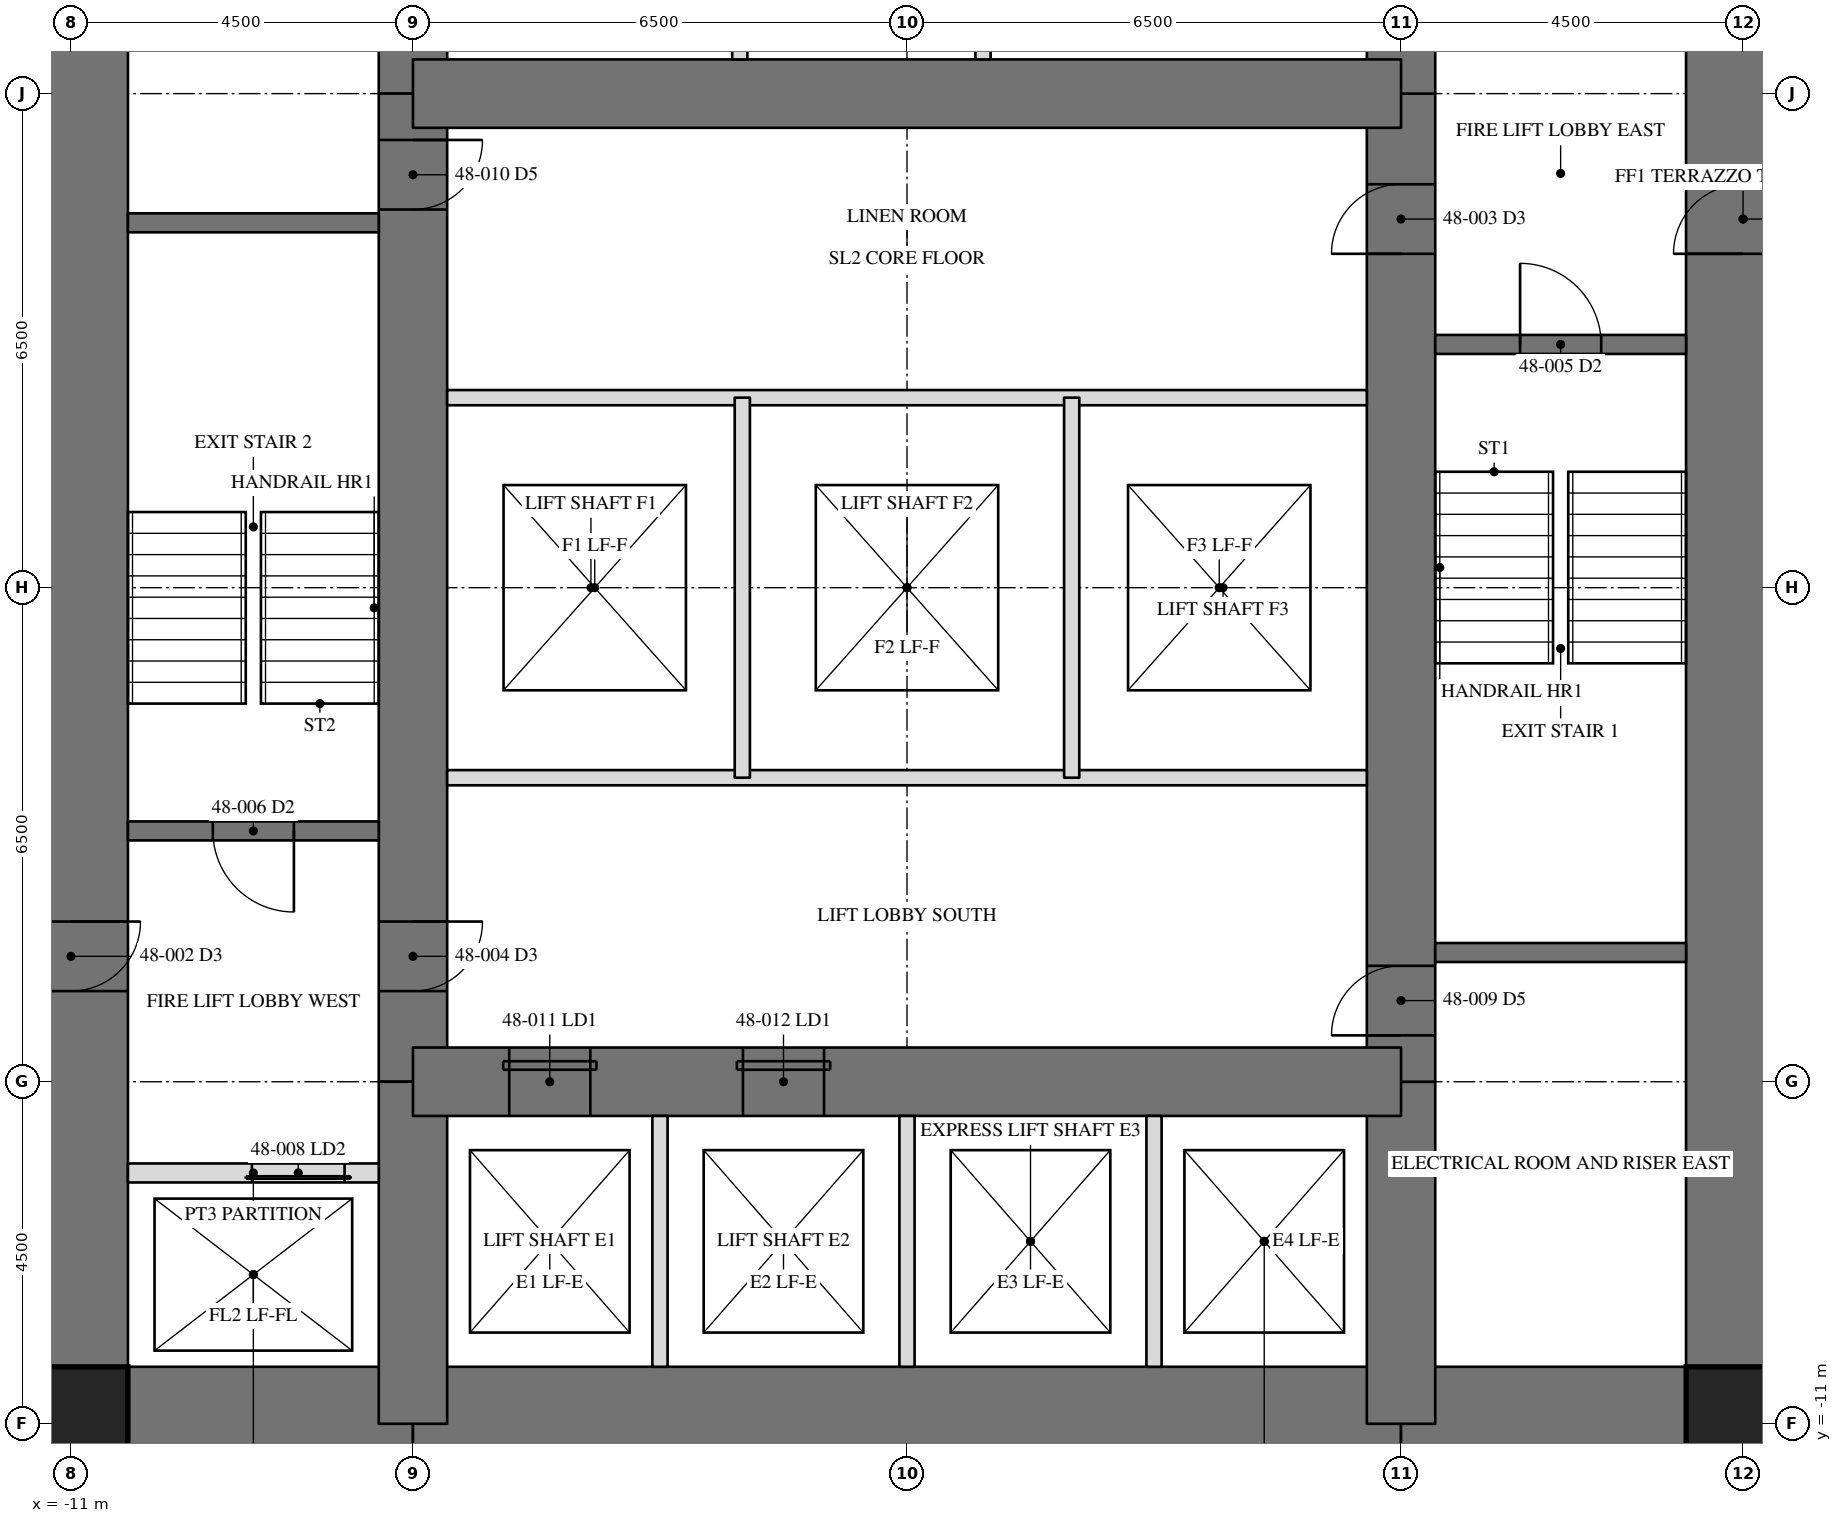
"""IFC4 building model, lengths in metres.
Left out: names, types, materials, properties, quantities, classifications, styles, units other than length and angle.
Written with IfcOpenShell. Run it as: python <this file> out.ifc"""

import sys

from ifc_helpers import new_model, si_unit, direction, frame, frame_2d, origin, origin_2d, place, context, subcontext, project, spatial, rectangle, hollow_rectangle, extrude, element, fill, save


model = new_model("IFC4")
c1 = context("Model", 3, precision=1e-05, world=origin(), true_north=direction((0.0, 1.0)))
c2 = subcontext(c1, "Body", "Model", "MODEL_VIEW")
j1 = project(units=[si_unit("LENGTHUNIT", "METRE"), si_unit("PLANEANGLEUNIT", "RADIAN")], contexts=[c1])
p1 = place(None, origin())
s1 = spatial("IfcSite", under=j1, at=p1, CompositionType="ELEMENT")
p2 = place(p1, origin())
s2 = spatial("IfcBuilding", under=s1, at=p2, CompositionType="ELEMENT")
p3 = place(p2, frame((0.0, 0.0, 204.7)))
s3 = spatial("IfcBuildingStorey", under=s2, at=p3, CompositionType="ELEMENT", Elevation=204.7)
p4 = place(p3, frame((11.0, -11.0, 0.0), z_axis=(0.0, 0.0, 1.0), x_axis=(0.0, 1.0, 0.0)))
e1 = element("IfcWall", 1, at=p4, inside=s3, PredefinedType="SHEAR", context=c2, shape_type="SweptSolid", body=[
    extrude(rectangle(XDim=22.0, YDim=1.5, at=frame_2d((11.0, 0.0))), origin(), (0.0, 0.0, 1.0), 3.5),
])
p5 = place(p4, frame((15.393, 0.0, 0.0)))
e2 = element("IfcOpeningElement", 2, at=p5, cuts=e1, PredefinedType="OPENING", context=c2, shape_type="SweptSolid", body=[
    extrude(rectangle(XDim=0.915, YDim=2.134, at=frame_2d((0.458, 1.067))), frame((0.0, 0.76, 0.0), z_axis=(0.0, -1.0, 0.0), x_axis=(1.0, 0.0, 0.0)), (0.0, 0.0, 1.0), 1.52),
])
p6 = place(p3, frame((-11.0, 11.0, 0.0), z_axis=(0.0, 0.0, 1.0), x_axis=(0.0, -1.0, 0.0)))
e3 = element("IfcWall", 3, at=p6, inside=s3, PredefinedType="SHEAR", context=c2, shape_type="SweptSolid", body=[
    extrude(rectangle(XDim=22.0, YDim=1.5, at=frame_2d((11.0, 0.0))), origin(), (0.0, 0.0, 1.0), 3.5),
])
p7 = place(p6, frame((15.393, 0.0, 0.0)))
e4 = element("IfcOpeningElement", 4, at=p7, cuts=e3, PredefinedType="OPENING", context=c2, shape_type="SweptSolid", body=[
    extrude(rectangle(XDim=0.915, YDim=2.134, at=frame_2d((0.458, 1.067))), frame((0.0, 0.76, 0.0), z_axis=(0.0, -1.0, 0.0), x_axis=(1.0, 0.0, 0.0)), (0.0, 0.0, 1.0), 1.52),
])
p8 = place(p3, frame((-11.0, -11.0, 0.0), z_axis=(0.0, 0.0, 1.0), x_axis=(1.0, 0.0, 0.0)))
e5 = element("IfcWall", 5, at=p8, inside=s3, PredefinedType="SHEAR", context=c2, shape_type="SweptSolid", body=[
    extrude(rectangle(XDim=4.5, YDim=1.5, at=frame_2d((2.25, 0.0))), origin(), (0.0, 0.0, 1.0), 3.5),
])
p9 = place(p3, frame((-6.5, -11.0, 0.0), z_axis=(0.0, 0.0, 1.0), x_axis=(1.0, 0.0, 0.0)))
e6 = element("IfcWall", 6, at=p9, inside=s3, PredefinedType="SHEAR", context=c2, shape_type="SweptSolid", body=[
    extrude(rectangle(XDim=13.0, YDim=1.5, at=frame_2d((6.5, 0.0))), origin(), (0.0, 0.0, 1.0), 3.5),
])
p10 = place(p3, frame((6.5, -11.0, 0.0), z_axis=(0.0, 0.0, 1.0), x_axis=(1.0, 0.0, 0.0)))
e7 = element("IfcWall", 7, at=p10, inside=s3, PredefinedType="SHEAR", context=c2, shape_type="SweptSolid", body=[
    extrude(rectangle(XDim=4.5, YDim=1.5, at=frame_2d((2.25, 0.0))), origin(), (0.0, 0.0, 1.0), 3.5),
])
p11 = place(p3, frame((6.5, -11.0, 0.0), z_axis=(0.0, 0.0, 1.0), x_axis=(0.0, 1.0, 0.0)))
e8 = element("IfcWall", 8, at=p11, inside=s3, PredefinedType="SHEAR", context=c2, shape_type="SweptSolid", body=[
    extrude(rectangle(XDim=4.5, YDim=0.9, at=frame_2d((2.25, 0.0))), origin(), (0.0, 0.0, 1.0), 3.5),
])
p12 = place(p3, frame((6.5, -6.5, 0.0), z_axis=(0.0, 0.0, 1.0), x_axis=(0.0, 1.0, 0.0)))
e9 = element("IfcWall", 9, at=p12, inside=s3, PredefinedType="SHEAR", context=c2, shape_type="SweptSolid", body=[
    extrude(rectangle(XDim=13.0, YDim=0.9, at=frame_2d((6.5, 0.0))), origin(), (0.0, 0.0, 1.0), 3.5),
])
p13 = place(p12, frame((10.893, 0.0, 0.0)))
e10 = element("IfcOpeningElement", 10, at=p13, cuts=e9, PredefinedType="OPENING", context=c2, shape_type="SweptSolid", body=[
    extrude(rectangle(XDim=0.915, YDim=2.134, at=frame_2d((0.458, 1.067))), frame((0.0, 0.46, 0.0), z_axis=(0.0, -1.0, 0.0), x_axis=(1.0, 0.0, 0.0)), (0.0, 0.0, 1.0), 0.92),
])
p14 = place(p12, frame((0.61, 0.0, 0.0)))
e11 = element("IfcOpeningElement", 11, at=p14, cuts=e9, PredefinedType="OPENING", context=c2, shape_type="SweptSolid", body=[
    extrude(rectangle(XDim=0.915, YDim=2.134, at=frame_2d((0.458, 1.067))), frame((0.0, 0.46, 0.0), z_axis=(0.0, -1.0, 0.0), x_axis=(1.0, 0.0, 0.0)), (0.0, 0.0, 1.0), 0.92),
])
for number, where, z_axis, x_axis in (
    (12, (6.5, 6.5, 0.0), (0.0, 0.0, 1.0), (0.0, 1.0, 0.0)),
    (13, (-6.5, 11.0, 0.0), (0.0, 0.0, 1.0), (0.0, -1.0, 0.0)),
):
    element("IfcWall", number, at=place(p3, frame(where, z_axis=z_axis, x_axis=x_axis)), inside=s3, PredefinedType="SHEAR", context=c2, shape_type="SweptSolid", body=[
        extrude(rectangle(XDim=4.5, YDim=0.9, at=frame_2d((2.25, 0.0))), origin(), (0.0, 0.0, 1.0), 3.5),
    ])
p15 = place(p3, frame((-6.5, 6.5, 0.0), z_axis=(0.0, 0.0, 1.0), x_axis=(0.0, -1.0, 0.0)))
e14 = element("IfcWall", 14, at=p15, inside=s3, PredefinedType="SHEAR", context=c2, shape_type="SweptSolid", body=[
    extrude(rectangle(XDim=13.0, YDim=0.9, at=frame_2d((6.5, 0.0))), origin(), (0.0, 0.0, 1.0), 3.5),
])
p16 = place(p15, frame((10.893, 0.0, 0.0)))
e15 = element("IfcOpeningElement", 15, at=p16, cuts=e14, PredefinedType="OPENING", context=c2, shape_type="SweptSolid", body=[
    extrude(rectangle(XDim=0.915, YDim=2.134, at=frame_2d((0.458, 1.067))), frame((0.0, 0.46, 0.0), z_axis=(0.0, -1.0, 0.0), x_axis=(1.0, 0.0, 0.0)), (0.0, 0.0, 1.0), 0.92),
])
p17 = place(p15, frame((0.61, 0.0, 0.0)))
e16 = element("IfcOpeningElement", 16, at=p17, cuts=e14, PredefinedType="OPENING", context=c2, shape_type="SweptSolid", body=[
    extrude(rectangle(XDim=0.915, YDim=2.134, at=frame_2d((0.458, 1.067))), frame((0.0, 0.46, 0.0), z_axis=(0.0, -1.0, 0.0), x_axis=(1.0, 0.0, 0.0)), (0.0, 0.0, 1.0), 0.92),
])
p18 = place(p3, frame((-6.5, -6.5, 0.0), z_axis=(0.0, 0.0, 1.0), x_axis=(0.0, -1.0, 0.0)))
e17 = element("IfcWall", 17, at=p18, inside=s3, PredefinedType="SHEAR", context=c2, shape_type="SweptSolid", body=[
    extrude(rectangle(XDim=4.5, YDim=0.9, at=frame_2d((2.25, 0.0))), origin(), (0.0, 0.0, 1.0), 3.5),
])
p19 = place(p3, frame((6.5, 6.5, 0.0), z_axis=(0.0, 0.0, 1.0), x_axis=(-1.0, 0.0, 0.0)))
e18 = element("IfcWall", 18, at=p19, inside=s3, PredefinedType="SHEAR", context=c2, shape_type="SweptSolid", body=[
    extrude(rectangle(XDim=13.0, YDim=0.9, at=frame_2d((6.5, 0.0))), origin(), (0.0, 0.0, 1.0), 3.5),
])
p20 = place(p3, frame((-6.5, -6.5, 0.0), z_axis=(0.0, 0.0, 1.0), x_axis=(1.0, 0.0, 0.0)))
e19 = element("IfcWall", 19, at=p20, inside=s3, PredefinedType="SHEAR", context=c2, shape_type="SweptSolid", body=[
    extrude(rectangle(XDim=13.0, YDim=0.9, at=frame_2d((6.5, 0.0))), origin(), (0.0, 0.0, 1.0), 3.5),
])
p21 = place(p20, frame((1.267, 0.0, 0.0)))
e20 = element("IfcOpeningElement", 20, at=p21, cuts=e19, PredefinedType="OPENING", context=c2, shape_type="SweptSolid", body=[
    extrude(rectangle(XDim=1.067, YDim=2.134, at=frame_2d((0.533, 1.067))), frame((0.0, 0.46, 0.0), z_axis=(0.0, -1.0, 0.0), x_axis=(1.0, 0.0, 0.0)), (0.0, 0.0, 1.0), 0.92),
])
p22 = place(p20, frame((4.342, 0.0, 0.0)))
e21 = element("IfcOpeningElement", 21, at=p22, cuts=e19, PredefinedType="OPENING", context=c2, shape_type="SweptSolid", body=[
    extrude(rectangle(XDim=1.067, YDim=2.134, at=frame_2d((0.533, 1.067))), frame((0.0, 0.46, 0.0), z_axis=(0.0, -1.0, 0.0), x_axis=(1.0, 0.0, 0.0)), (0.0, 0.0, 1.0), 0.92),
])
for number, where, z_axis, x_axis in (
    (22, (-11.0, -11.0, 0.0), (0.0, 0.0, 1.0), (1.0, 0.0, 0.0)),
    (23, (11.0, -11.0, 0.0), (0.0, 0.0, 1.0), (1.0, 0.0, 0.0)),
):
    element("IfcColumn", number, at=place(p3, frame(where, z_axis=z_axis, x_axis=x_axis)), inside=s3, PredefinedType="COLUMN", context=c2, shape_type="SweptSolid", body=[
        extrude(hollow_rectangle(XDim=1.499, YDim=1.499, WallThickness=0.102, at=origin_2d()), origin(), (0.0, 0.0, 1.0), 3.5),
    ])
for number, where, z_axis, x_axis in (
    (24, (6.95, -4.8, 0.0), (0.0, 0.0, 1.0), (1.0, 0.0, 0.0)),
    (25, (-6.95, 4.8, 0.0), (0.0, 0.0, 1.0), (-1.0, 0.0, 0.0)),
):
    element("IfcWall", number, at=place(p3, frame(where, z_axis=z_axis, x_axis=x_axis)), inside=s3, PredefinedType="SOLIDWALL", context=c2, shape_type="SweptSolid", body=[
        extrude(rectangle(XDim=3.3, YDim=0.25, at=frame_2d((1.65, 0.0))), origin(), (0.0, 0.0, 1.0), 3.31),
    ])
p23 = place(p3, frame((6.95, 3.2, 0.0), z_axis=(0.0, 0.0, 1.0), x_axis=(1.0, 0.0, 0.0)))
e26 = element("IfcWall", 26, at=p23, inside=s3, PredefinedType="SOLIDWALL", context=c2, shape_type="SweptSolid", body=[
    extrude(rectangle(XDim=3.3, YDim=0.25, at=frame_2d((1.65, 0.0))), origin(), (0.0, 0.0, 1.0), 3.31),
])
p24 = place(p23, frame((1.116, 0.0, 0.0)))
e27 = element("IfcOpeningElement", 27, at=p24, cuts=e26, PredefinedType="OPENING", context=c2, shape_type="SweptSolid", body=[
    extrude(rectangle(XDim=1.067, YDim=2.134, at=frame_2d((0.533, 1.067))), frame((0.0, 0.135, 0.0), z_axis=(0.0, -1.0, 0.0), x_axis=(1.0, 0.0, 0.0)), (0.0, 0.0, 1.0), 0.27),
])
p25 = place(p3, frame((-6.95, -3.2, 0.0), z_axis=(0.0, 0.0, 1.0), x_axis=(-1.0, 0.0, 0.0)))
e28 = element("IfcWall", 28, at=p25, inside=s3, PredefinedType="SOLIDWALL", context=c2, shape_type="SweptSolid", body=[
    extrude(rectangle(XDim=3.3, YDim=0.25, at=frame_2d((1.65, 0.0))), origin(), (0.0, 0.0, 1.0), 3.31),
])
p26 = place(p25, frame((1.116, 0.0, 0.0)))
e29 = element("IfcOpeningElement", 29, at=p26, cuts=e28, PredefinedType="OPENING", context=c2, shape_type="SweptSolid", body=[
    extrude(rectangle(XDim=1.067, YDim=2.134, at=frame_2d((0.533, 1.067))), frame((0.0, 0.135, 0.0), z_axis=(0.0, -1.0, 0.0), x_axis=(1.0, 0.0, 0.0)), (0.0, 0.0, 1.0), 0.27),
])
p27 = place(p3, frame((-6.95, -7.7, 0.0), z_axis=(0.0, 0.0, 1.0), x_axis=(-1.0, 0.0, 0.0)))
e30 = element("IfcWall", 30, at=p27, inside=s3, PredefinedType="PARTITIONING", context=c2, shape_type="SweptSolid", body=[
    extrude(rectangle(XDim=3.3, YDim=0.25, at=frame_2d((1.65, 0.0))), origin(), (0.0, 0.0, 1.0), 3.31),
])
p28 = place(p27, frame((0.45, 0.0, 0.0)))
e31 = element("IfcOpeningElement", 31, at=p28, cuts=e30, PredefinedType="OPENING", context=c2, shape_type="SweptSolid", body=[
    extrude(rectangle(XDim=1.219, YDim=2.134, at=frame_2d((0.609, 1.067))), frame((0.0, 0.135, 0.0), z_axis=(0.0, -1.0, 0.0), x_axis=(1.0, 0.0, 0.0)), (0.0, 0.0, 1.0), 0.27),
])
for number, where, z_axis, x_axis in (
    (32, (-6.05, 2.5, 0.0), (0.0, 0.0, 1.0), (1.0, 0.0, 0.0)),
    (33, (6.05, -2.5, 0.0), (0.0, 0.0, 1.0), (-1.0, 0.0, 0.0)),
):
    element("IfcWall", number, at=place(p3, frame(where, z_axis=z_axis, x_axis=x_axis)), inside=s3, PredefinedType="PARTITIONING", context=c2, shape_type="SweptSolid", body=[
        extrude(rectangle(XDim=12.1, YDim=0.2, at=frame_2d((6.05, 0.0))), origin(), (0.0, 0.0, 1.0), 3.31),
    ])
for number, where, z_axis, x_axis in (
    (34, (-3.25, -10.25, 0.0), (0.0, 0.0, 1.0), (0.0, 1.0, 0.0)),
    (35, (0.0, -10.25, 0.0), (0.0, 0.0, 1.0), (0.0, 1.0, 0.0)),
    (36, (3.25, -10.25, 0.0), (0.0, 0.0, 1.0), (0.0, 1.0, 0.0)),
):
    element("IfcWall", number, at=place(p3, frame(where, z_axis=z_axis, x_axis=x_axis)), inside=s3, PredefinedType="PARTITIONING", context=c2, shape_type="SweptSolid", body=[
        extrude(rectangle(XDim=3.3, YDim=0.2, at=frame_2d((1.65, 0.0))), origin(), (0.0, 0.0, 1.0), 3.31),
    ])
for number, where, z_axis, x_axis in (
    (37, (-2.167, -2.5, 0.0), (0.0, 0.0, 1.0), (0.0, 1.0, 0.0)),
    (38, (2.167, -2.5, 0.0), (0.0, 0.0, 1.0), (0.0, 1.0, 0.0)),
):
    element("IfcWall", number, at=place(p3, frame(where, z_axis=z_axis, x_axis=x_axis)), inside=s3, PredefinedType="PARTITIONING", context=c2, shape_type="SweptSolid", body=[
        extrude(rectangle(XDim=5.0, YDim=0.2, at=frame_2d((2.5, 0.0))), origin(), (0.0, 0.0, 1.0), 3.31),
    ])
p29 = place(p3, frame((-2.2, 6.95, 0.0), z_axis=(0.0, 0.0, 1.0), x_axis=(0.0, 1.0, 0.0)))
e39 = element("IfcWall", 39, at=p29, inside=s3, PredefinedType="PARTITIONING", context=c2, shape_type="SweptSolid", body=[
    extrude(rectangle(XDim=3.3, YDim=0.2, at=frame_2d((1.65, 0.0))), origin(), (0.0, 0.0, 1.0), 3.31),
])
p30 = place(p29, frame((1.192, 0.0, 0.0)))
e40 = element("IfcOpeningElement", 40, at=p30, cuts=e39, PredefinedType="OPENING", context=c2, shape_type="SweptSolid", body=[
    extrude(rectangle(XDim=0.915, YDim=2.134, at=frame_2d((0.458, 1.067))), frame((0.0, 0.11, 0.0), z_axis=(0.0, -1.0, 0.0), x_axis=(1.0, 0.0, 0.0)), (0.0, 0.0, 1.0), 0.22),
])
p31 = place(p3, frame((1.0, 6.95, 0.0), z_axis=(0.0, 0.0, 1.0), x_axis=(0.0, 1.0, 0.0)))
e41 = element("IfcWall", 41, at=p31, inside=s3, PredefinedType="PARTITIONING", context=c2, shape_type="SweptSolid", body=[
    extrude(rectangle(XDim=3.3, YDim=0.2, at=frame_2d((1.65, 0.0))), origin(), (0.0, 0.0, 1.0), 3.31),
])
p32 = place(p31, frame((1.192, 0.0, 0.0)))
e42 = element("IfcOpeningElement", 42, at=p32, cuts=e41, PredefinedType="OPENING", context=c2, shape_type="SweptSolid", body=[
    extrude(rectangle(XDim=0.915, YDim=2.134, at=frame_2d((0.458, 1.067))), frame((0.0, 0.11, 0.0), z_axis=(0.0, -1.0, 0.0), x_axis=(1.0, 0.0, 0.0)), (0.0, 0.0, 1.0), 0.22),
])
p33 = place(p13, origin())
e43 = element("IfcDoor", 43, at=p33, inside=s3, OperationType="SINGLE_SWING_RIGHT", PredefinedType="DOOR", context=c2, shape_type="SweptSolid", body=[
    extrude(rectangle(XDim=0.915, YDim=2.134, at=frame_2d((0.458, 1.067))), frame((0.0, -0.375, 0.0), z_axis=(0.0, -1.0, 0.0), x_axis=(1.0, 0.0, 0.0)), (0.0, 0.0, 1.0), 0.05),
])
fill(e10, e43)
p34 = place(p16, origin())
e44 = element("IfcDoor", 44, at=p34, inside=s3, OperationType="SINGLE_SWING_RIGHT", PredefinedType="DOOR", context=c2, shape_type="SweptSolid", body=[
    extrude(rectangle(XDim=0.915, YDim=2.134, at=frame_2d((0.458, 1.067))), frame((0.0, -0.375, 0.0), z_axis=(0.0, -1.0, 0.0), x_axis=(1.0, 0.0, 0.0)), (0.0, 0.0, 1.0), 0.05),
])
fill(e15, e44)
p35 = place(p24, origin())
e45 = element("IfcDoor", 45, at=p35, inside=s3, OperationType="SINGLE_SWING_LEFT", PredefinedType="DOOR", context=c2, shape_type="SweptSolid", body=[
    extrude(rectangle(XDim=1.067, YDim=2.134, at=frame_2d((0.533, 1.067))), frame((0.0, 0.025, 0.0), z_axis=(0.0, -1.0, 0.0), x_axis=(1.0, 0.0, 0.0)), (0.0, 0.0, 1.0), 0.05),
])
fill(e27, e45)
p36 = place(p26, origin())
e46 = element("IfcDoor", 46, at=p36, inside=s3, OperationType="SINGLE_SWING_LEFT", PredefinedType="DOOR", context=c2, shape_type="SweptSolid", body=[
    extrude(rectangle(XDim=1.067, YDim=2.134, at=frame_2d((0.533, 1.067))), frame((0.0, 0.025, 0.0), z_axis=(0.0, -1.0, 0.0), x_axis=(1.0, 0.0, 0.0)), (0.0, 0.0, 1.0), 0.05),
])
fill(e29, e46)
p37 = place(p28, origin())
e47 = element("IfcDoor", 47, at=p37, inside=s3, OperationType="SLIDING_TO_LEFT", PredefinedType="DOOR", context=c2, shape_type="SweptSolid", body=[
    extrude(rectangle(XDim=1.219, YDim=2.134, at=frame_2d((0.609, 1.067))), frame((0.0, 0.025, 0.0), z_axis=(0.0, -1.0, 0.0), x_axis=(1.0, 0.0, 0.0)), (0.0, 0.0, 1.0), 0.05),
])
fill(e31, e47)
p38 = place(p14, origin())
e48 = element("IfcDoor", 48, at=p38, inside=s3, OperationType="SINGLE_SWING_RIGHT", PredefinedType="DOOR", context=c2, shape_type="SweptSolid", body=[
    extrude(rectangle(XDim=0.915, YDim=2.134, at=frame_2d((0.458, 1.067))), frame((0.0, -0.375, 0.0), z_axis=(0.0, -1.0, 0.0), x_axis=(1.0, 0.0, 0.0)), (0.0, 0.0, 1.0), 0.05),
])
fill(e11, e48)
p39 = place(p17, origin())
e49 = element("IfcDoor", 49, at=p39, inside=s3, OperationType="SINGLE_SWING_RIGHT", PredefinedType="DOOR", context=c2, shape_type="SweptSolid", body=[
    extrude(rectangle(XDim=0.915, YDim=2.134, at=frame_2d((0.458, 1.067))), frame((0.0, -0.375, 0.0), z_axis=(0.0, -1.0, 0.0), x_axis=(1.0, 0.0, 0.0)), (0.0, 0.0, 1.0), 0.05),
])
fill(e16, e49)
p40 = place(p21, origin())
e50 = element("IfcDoor", 50, at=p40, inside=s3, OperationType="SLIDING_TO_LEFT", PredefinedType="DOOR", context=c2, shape_type="SweptSolid", body=[
    extrude(rectangle(XDim=1.067, YDim=2.134, at=frame_2d((0.533, 1.067))), frame((0.0, -0.375, 0.0), z_axis=(0.0, -1.0, 0.0), x_axis=(1.0, 0.0, 0.0)), (0.0, 0.0, 1.0), 0.05),
])
fill(e20, e50)
p41 = place(p22, origin())
e51 = element("IfcDoor", 51, at=p41, inside=s3, OperationType="SLIDING_TO_LEFT", PredefinedType="DOOR", context=c2, shape_type="SweptSolid", body=[
    extrude(rectangle(XDim=1.067, YDim=2.134, at=frame_2d((0.533, 1.067))), frame((0.0, -0.375, 0.0), z_axis=(0.0, -1.0, 0.0), x_axis=(1.0, 0.0, 0.0)), (0.0, 0.0, 1.0), 0.05),
])
fill(e21, e51)
save(model, sys.argv[1])
